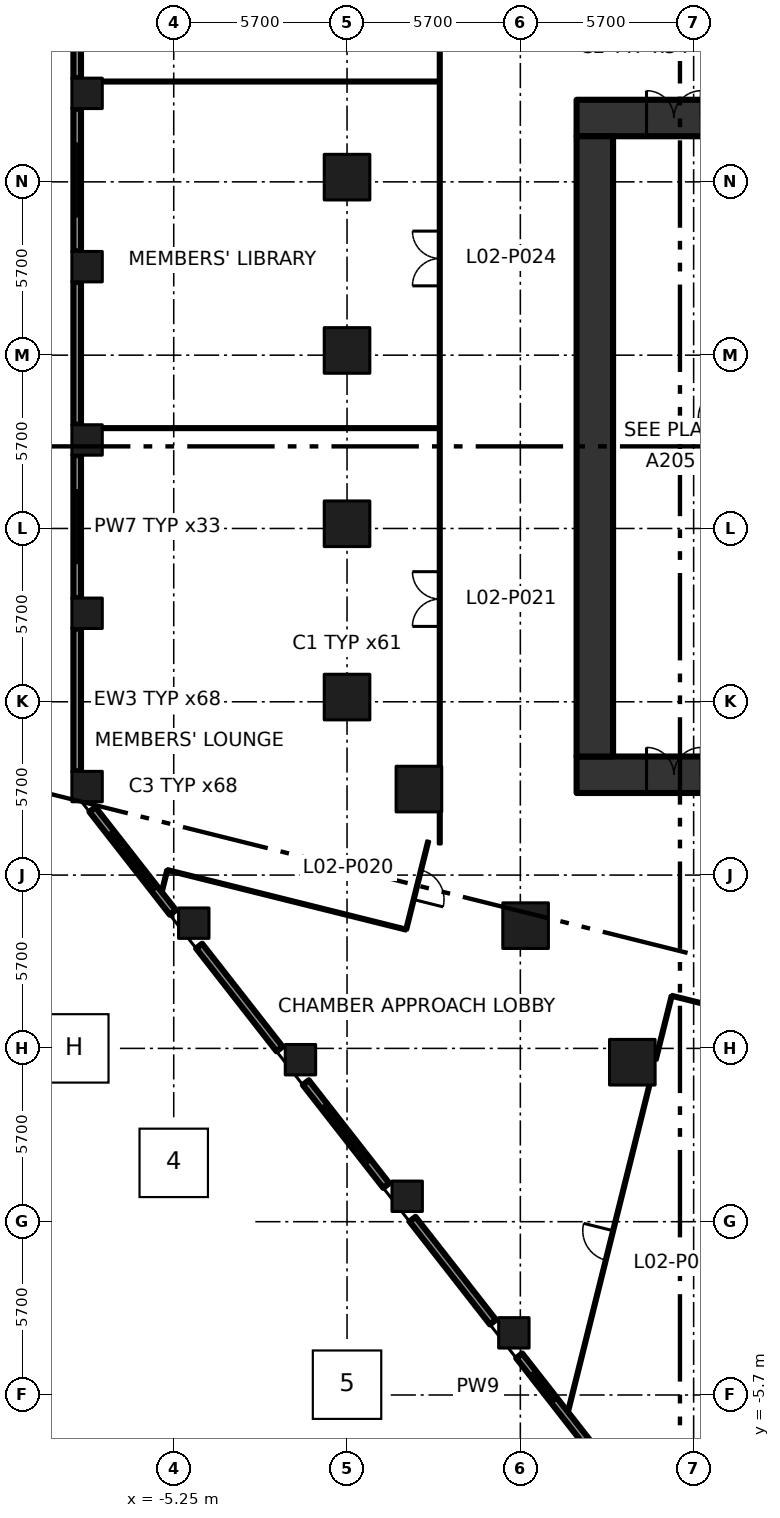
"""IFC4 building model, lengths in metres.
Left out: names, types, materials, properties, quantities, classifications, styles, units other than length and angle.
Written with IfcOpenShell. Run it as: python <this file> out.ifc"""

import sys

from ifc_helpers import new_model, si_unit, direction, frame, frame_2d, origin, origin_2d, place, context, subcontext, project, spatial, rectangle, extrude, element, fill, save


model = new_model("IFC4")
c1 = context("Model", 3, precision=1e-05, world=origin(), true_north=direction((0.0, 1.0)))
c2 = subcontext(c1, "Body", "Model", "MODEL_VIEW")
j1 = project(units=[si_unit("LENGTHUNIT", "METRE"), si_unit("PLANEANGLEUNIT", "RADIAN")], contexts=[c1])
p1 = place(None, origin())
s1 = spatial("IfcSite", under=j1, at=p1, CompositionType="ELEMENT")
p2 = place(p1, origin())
s2 = spatial("IfcBuilding", under=s1, at=p2, CompositionType="ELEMENT")
p3 = place(p2, frame((0.0, 0.0, 12.6)))
s3 = spatial("IfcBuildingStorey", under=s2, at=p3, CompositionType="ELEMENT", Elevation=12.6)
for number, where, z_axis, x_axis in (
    (1, (0.45, 17.255, 0.0), (0.0, 0.0, 1.0), (1.0, 0.0, 0.0)),
    (2, (0.45, 22.955, 0.0), (0.0, 0.0, 1.0), (1.0, 0.0, 0.0)),
    (3, (0.45, 28.655, 0.0), (0.0, 0.0, 1.0), (1.0, 0.0, 0.0)),
    (4, (0.45, 34.355, 0.0), (0.0, 0.0, 1.0), (1.0, 0.0, 0.0)),
    (5, (9.833, 5.245, 0.0), (0.0, 0.0, 1.0), (1.0, 0.0, 0.0)),
    (6, (6.323, 9.737, 0.0), (0.0, 0.0, 1.0), (1.0, 0.0, 0.0)),
    (7, (2.814, 14.229, 0.0), (0.0, 0.0, 1.0), (1.0, 0.0, 0.0)),
):
    element("IfcColumn", number, at=place(p3, frame(where, z_axis=z_axis, x_axis=x_axis)), inside=s3, PredefinedType="COLUMN", context=c2, shape_type="SweptSolid", body=[
        extrude(rectangle(XDim=1.5, YDim=1.5, at=origin_2d()), origin(), (0.0, 0.0, 1.0), 6.0),
    ])
for number, where, z_axis, x_axis in (
    (8, (-8.1, 14.311, 0.0), (0.0, 0.0, 1.0), (1.0, 0.0, 0.0)),
    (9, (-8.1, 20.011, 0.0), (0.0, 0.0, 1.0), (1.0, 0.0, 0.0)),
    (10, (-8.1, 25.711, 0.0), (0.0, 0.0, 1.0), (1.0, 0.0, 0.0)),
    (11, (-8.1, 31.411, 0.0), (0.0, 0.0, 1.0), (1.0, 0.0, 0.0)),
    (12, (-8.1, 37.111, 0.0), (0.0, 0.0, 1.0), (1.0, 0.0, 0.0)),
    (13, (-4.591, 9.819, 0.0), (0.0, 0.0, 1.0), (1.0, 0.0, 0.0)),
    (14, (-1.082, 5.328, 0.0), (0.0, 0.0, 1.0), (1.0, 0.0, 0.0)),
    (15, (2.428, 0.836, 0.0), (0.0, 0.0, 1.0), (1.0, 0.0, 0.0)),
    (16, (5.937, -3.656, 0.0), (0.0, 0.0, 1.0), (1.0, 0.0, 0.0)),
):
    element("IfcColumn", number, at=place(p3, frame(where, z_axis=z_axis, x_axis=x_axis)), inside=s3, PredefinedType="COLUMN", context=c2, shape_type="SweptSolid", body=[
        extrude(rectangle(XDim=1.0, YDim=1.0, at=origin_2d()), origin(), (0.0, 0.0, 1.0), 6.0),
    ])
p4 = place(p3, frame((8.0, 14.7, -0.45), z_axis=(0.0, 0.0, 1.0), x_axis=(1.0, 0.0, 0.0)))
e17 = element("IfcWall", 17, at=p4, inside=s3, PredefinedType="SHEAR", context=c2, shape_type="SweptSolid", body=[
    extrude(rectangle(XDim=22.8, YDim=1.2, at=frame_2d((11.4, 0.0))), origin(), (0.0, 0.0, 1.0), 6.0),
])
p5 = place(p4, frame((2.3, 0.0, 0.45)))
e18 = element("IfcOpeningElement", 18, at=p5, cuts=e17, PredefinedType="OPENING", context=c2, shape_type="SweptSolid", body=[
    extrude(rectangle(XDim=1.8, YDim=2.1, at=frame_2d((0.9, 1.05))), frame((0.0, 0.61, 0.0), z_axis=(0.0, -1.0, 0.0), x_axis=(1.0, 0.0, 0.0)), (0.0, 0.0, 1.0), 1.22),
])
p6 = place(p3, frame((8.0, 36.3, -0.45), z_axis=(0.0, 0.0, 1.0), x_axis=(1.0, 0.0, 0.0)))
e19 = element("IfcWall", 19, at=p6, inside=s3, PredefinedType="SHEAR", context=c2, shape_type="SweptSolid", body=[
    extrude(rectangle(XDim=22.8, YDim=1.2, at=frame_2d((11.4, 0.0))), origin(), (0.0, 0.0, 1.0), 6.0),
])
p7 = place(p6, frame((2.3, 0.0, 0.45)))
e20 = element("IfcOpeningElement", 20, at=p7, cuts=e19, PredefinedType="OPENING", context=c2, shape_type="SweptSolid", body=[
    extrude(rectangle(XDim=1.8, YDim=2.1, at=frame_2d((0.9, 1.05))), frame((0.0, 0.61, 0.0), z_axis=(0.0, -1.0, 0.0), x_axis=(1.0, 0.0, 0.0)), (0.0, 0.0, 1.0), 1.22),
])
p8 = place(p3, frame((8.6, 15.3, -0.45), z_axis=(0.0, 0.0, 1.0), x_axis=(0.0, 1.0, 0.0)))
e21 = element("IfcWall", 21, at=p8, inside=s3, PredefinedType="SHEAR", context=c2, shape_type="SweptSolid", body=[
    extrude(rectangle(XDim=20.4, YDim=1.2, at=frame_2d((10.2, 0.0))), origin(), (0.0, 0.0, 1.0), 6.0),
])
p9 = place(p3, frame((-5.464, 11.565, 0.0), z_axis=(0.0, 0.0, 1.0), x_axis=(-0.24207252228, -0.970258158408, 0.0)))
e22 = element("IfcWall", 22, at=p9, inside=s3, PredefinedType="PARTITIONING", context=c2, shape_type="SweptSolid", body=[
    extrude(rectangle(XDim=0.744, YDim=0.1, at=frame_2d((0.372, 0.0))), origin(), (0.0, 0.0, 1.0), 5.55),
])
p10 = place(p3, frame((2.395, 9.606, 0.0), z_axis=(0.0, 0.0, 1.0), x_axis=(-0.97031070843, 0.241861797535, 0.0)))
e23 = element("IfcWall", 23, at=p10, inside=s3, PredefinedType="PARTITIONING", context=c2, shape_type="SweptSolid", body=[
    extrude(rectangle(XDim=8.1, YDim=0.1, at=frame_2d((4.05, 0.0))), origin(), (0.0, 0.0, 1.0), 5.55),
])
p11 = place(p3, frame((3.121, 12.517, 0.0), z_axis=(0.0, 0.0, 1.0), x_axis=(-0.241999491975, -0.970276376031, 0.0)))
e24 = element("IfcWall", 24, at=p11, inside=s3, PredefinedType="PARTITIONING", context=c2, shape_type="SweptSolid", body=[
    extrude(rectangle(XDim=3.0, YDim=0.1, at=frame_2d((1.5, 0.0))), origin(), (0.0, 0.0, 1.0), 5.55),
])
p12 = place(p11, frame((0.98, 0.0, 0.0)))
e25 = element("IfcOpeningElement", 25, at=p12, cuts=e24, PredefinedType="OPENING", context=c2, shape_type="SweptSolid", body=[
    extrude(rectangle(XDim=1.0, YDim=2.1, at=frame_2d((0.5, 1.05))), frame((0.0, 0.06, 0.0), z_axis=(0.0, -1.0, 0.0), x_axis=(1.0, 0.0, 0.0)), (0.0, 0.0, 1.0), 0.12),
])
p13 = place(p3, frame((3.5, 13.459, 0.0), z_axis=(0.0, 0.0, 1.0), x_axis=(0.0, -1.0, 0.0)))
e26 = element("IfcWall", 26, at=p13, inside=s3, PredefinedType="PARTITIONING", context=c2, shape_type="SweptSolid", body=[
    extrude(rectangle(XDim=1.036, YDim=0.1, at=frame_2d((0.518, 0.0))), origin(), (0.0, 0.0, 1.0), 5.55),
])
p14 = place(p3, frame((3.5, 14.999, 0.0), z_axis=(0.0, 0.0, 1.0), x_axis=(0.0, 1.0, 0.0)))
e27 = element("IfcWall", 27, at=p14, inside=s3, PredefinedType="PARTITIONING", context=c2, shape_type="SweptSolid", body=[
    extrude(rectangle(XDim=26.401, YDim=0.1, at=frame_2d((13.2, 0.0))), origin(), (0.0, 0.0, 1.0), 5.55),
])
p15 = place(p14, frame((4.58, 0.0, 0.0)))
e28 = element("IfcOpeningElement", 28, at=p15, cuts=e27, PredefinedType="OPENING", context=c2, shape_type="SweptSolid", body=[
    extrude(rectangle(XDim=1.8, YDim=2.1, at=frame_2d((0.9, 1.05))), frame((0.0, 0.06, 0.0), z_axis=(0.0, -1.0, 0.0), x_axis=(1.0, 0.0, 0.0)), (0.0, 0.0, 1.0), 0.12),
])
p16 = place(p14, frame((15.781, 0.0, 0.0)))
e29 = element("IfcOpeningElement", 29, at=p16, cuts=e27, PredefinedType="OPENING", context=c2, shape_type="SweptSolid", body=[
    extrude(rectangle(XDim=1.8, YDim=2.1, at=frame_2d((0.9, 1.05))), frame((0.0, 0.06, 0.0), z_axis=(0.0, -1.0, 0.0), x_axis=(1.0, 0.0, 0.0)), (0.0, 0.0, 1.0), 0.12),
])
p17 = place(p14, frame((23.681, 0.0, 0.0)))
e30 = element("IfcOpeningElement", 30, at=p17, cuts=e27, PredefinedType="OPENING", context=c2, shape_type="SweptSolid", body=[
    extrude(rectangle(XDim=1.8, YDim=2.1, at=frame_2d((0.9, 1.05))), frame((0.0, 0.06, 0.0), z_axis=(0.0, -1.0, 0.0), x_axis=(1.0, 0.0, 0.0)), (0.0, 0.0, 1.0), 0.12),
])
p18 = place(p3, frame((7.716, -6.257, 0.0), z_axis=(0.0, 0.0, 1.0), x_axis=(0.241891576484, 0.970303285177, 0.0)))
e31 = element("IfcWall", 31, at=p18, inside=s3, PredefinedType="PARTITIONING", context=c2, shape_type="SweptSolid", body=[
    extrude(rectangle(XDim=11.061, YDim=0.1, at=frame_2d((5.53, 0.0))), origin(), (0.0, 0.0, 1.0), 5.55),
])
p19 = place(p18, frame((5.144, 0.0, 0.0)))
e32 = element("IfcOpeningElement", 32, at=p19, cuts=e31, PredefinedType="OPENING", context=c2, shape_type="SweptSolid", body=[
    extrude(rectangle(XDim=1.0, YDim=2.1, at=frame_2d((0.5, 1.05))), frame((0.0, 0.06, 0.0), z_axis=(0.0, -1.0, 0.0), x_axis=(1.0, 0.0, 0.0)), (0.0, 0.0, 1.0), 0.12),
])
p20 = place(p3, frame((10.603, 5.323, 0.0), z_axis=(0.0, 0.0, 1.0), x_axis=(0.241847407238, 0.970314295273, 0.0)))
e33 = element("IfcWall", 33, at=p20, inside=s3, PredefinedType="PARTITIONING", context=c2, shape_type="SweptSolid", body=[
    extrude(rectangle(XDim=2.17, YDim=0.1, at=frame_2d((1.085, 0.0))), origin(), (0.0, 0.0, 1.0), 5.55),
])
p21 = place(p3, frame((11.128, 7.429, 0.0), z_axis=(0.0, 0.0, 1.0), x_axis=(0.970310377339, -0.241863125815, 0.0)))
e34 = element("IfcWall", 34, at=p21, inside=s3, PredefinedType="PARTITIONING", context=c2, shape_type="SweptSolid", body=[
    extrude(rectangle(XDim=7.859, YDim=0.1, at=frame_2d((3.93, 0.0))), origin(), (0.0, 0.0, 1.0), 5.55),
])
for number, where, z_axis, x_axis in (
    (35, (3.45, 26.1, 0.0), (0.0, 0.0, 1.0), (-1.0, 0.0, 0.0)),
    (36, (3.45, 37.5, 0.0), (0.0, 0.0, 1.0), (-1.0, 0.0, 0.0)),
):
    element("IfcWall", number, at=place(p3, frame(where, z_axis=z_axis, x_axis=x_axis)), inside=s3, PredefinedType="PARTITIONING", context=c2, shape_type="SweptSolid", body=[
        extrude(rectangle(XDim=11.03, YDim=0.1, at=frame_2d((5.515, 0.0))), origin(), (0.0, 0.0, 1.0), 5.55),
    ])
p22 = place(p3, frame((-8.425, 42.311, 0.0), z_axis=(0.0, 0.0, 1.0), x_axis=(0.0, -1.0, 0.0)))
e37 = element("IfcWall", 37, at=p22, inside=s3, PredefinedType="SOLIDWALL", context=c2, shape_type="SweptSolid", body=[
    extrude(rectangle(XDim=4.7, YDim=0.25, at=frame_2d((2.35, 0.0))), origin(), (0.0, 0.0, 1.0), 4.65),
])
p23 = place(p3, frame((-8.425, 36.611, 0.0), z_axis=(0.0, 0.0, 1.0), x_axis=(0.0, -1.0, 0.0)))
e38 = element("IfcWall", 38, at=p23, inside=s3, PredefinedType="SOLIDWALL", context=c2, shape_type="SweptSolid", body=[
    extrude(rectangle(XDim=4.7, YDim=0.25, at=frame_2d((2.35, 0.0))), origin(), (0.0, 0.0, 1.0), 4.65),
])
p24 = place(p23, frame((1.15, 0.0, 0.9)))
e39 = element("IfcOpeningElement", 39, at=p24, cuts=e38, PredefinedType="OPENING", context=c2, shape_type="SweptSolid", body=[
    extrude(rectangle(XDim=2.4, YDim=3.3, at=frame_2d((1.2, 1.65))), frame((0.0, 0.135, 0.0), z_axis=(0.0, -1.0, 0.0), x_axis=(1.0, 0.0, 0.0)), (0.0, 0.0, 1.0), 0.27),
])
p25 = place(p3, frame((-8.425, 30.911, 0.0), z_axis=(0.0, 0.0, 1.0), x_axis=(0.0, -1.0, 0.0)))
e40 = element("IfcWall", 40, at=p25, inside=s3, PredefinedType="SOLIDWALL", context=c2, shape_type="SweptSolid", body=[
    extrude(rectangle(XDim=4.7, YDim=0.25, at=frame_2d((2.35, 0.0))), origin(), (0.0, 0.0, 1.0), 4.65),
])
p26 = place(p3, frame((-8.425, 25.211, 0.0), z_axis=(0.0, 0.0, 1.0), x_axis=(0.0, -1.0, 0.0)))
e41 = element("IfcWall", 41, at=p26, inside=s3, PredefinedType="SOLIDWALL", context=c2, shape_type="SweptSolid", body=[
    extrude(rectangle(XDim=4.7, YDim=0.25, at=frame_2d((2.35, 0.0))), origin(), (0.0, 0.0, 1.0), 4.65),
])
p27 = place(p26, frame((1.15, 0.0, 0.9)))
e42 = element("IfcOpeningElement", 42, at=p27, cuts=e41, PredefinedType="OPENING", context=c2, shape_type="SweptSolid", body=[
    extrude(rectangle(XDim=2.4, YDim=3.3, at=frame_2d((1.2, 1.65))), frame((0.0, 0.135, 0.0), z_axis=(0.0, -1.0, 0.0), x_axis=(1.0, 0.0, 0.0)), (0.0, 0.0, 1.0), 0.27),
])
p28 = place(p3, frame((-8.425, 19.511, 0.0), z_axis=(0.0, 0.0, 1.0), x_axis=(0.0, -1.0, 0.0)))
e43 = element("IfcWall", 43, at=p28, inside=s3, PredefinedType="SOLIDWALL", context=c2, shape_type="SweptSolid", body=[
    extrude(rectangle(XDim=4.7, YDim=0.25, at=frame_2d((2.35, 0.0))), origin(), (0.0, 0.0, 1.0), 4.65),
])
p29 = place(p3, frame((-7.924, 13.558, 0.0), z_axis=(0.0, 0.0, 1.0), x_axis=(0.615603242749, -0.788056246417, 0.0)))
e44 = element("IfcWall", 44, at=p29, inside=s3, PredefinedType="SOLIDWALL", context=c2, shape_type="SweptSolid", body=[
    extrude(rectangle(XDim=4.297, YDim=0.25, at=frame_2d((2.148, 0.0))), origin(), (0.0, 0.0, 1.0), 4.65),
])
p30 = place(p29, frame((0.948, 0.0, 0.9)))
e45 = element("IfcOpeningElement", 45, at=p30, cuts=e44, PredefinedType="OPENING", context=c2, shape_type="SweptSolid", body=[
    extrude(rectangle(XDim=2.4, YDim=3.3, at=frame_2d((1.2, 1.65))), frame((0.0, 0.135, 0.0), z_axis=(0.0, -1.0, 0.0), x_axis=(1.0, 0.0, 0.0)), (0.0, 0.0, 1.0), 0.27),
])
p31 = place(p3, frame((-4.415, 9.066, 0.0), z_axis=(0.0, 0.0, 1.0), x_axis=(0.615713519567, -0.787970089421, 0.0)))
e46 = element("IfcWall", 46, at=p31, inside=s3, PredefinedType="SOLIDWALL", context=c2, shape_type="SweptSolid", body=[
    extrude(rectangle(XDim=4.296, YDim=0.25, at=frame_2d((2.148, 0.0))), origin(), (0.0, 0.0, 1.0), 4.65),
])
p32 = place(p3, frame((-0.906, 4.575, 0.0), z_axis=(0.0, 0.0, 1.0), x_axis=(0.61574436495, -0.787945986113, 0.0)))
e47 = element("IfcWall", 47, at=p32, inside=s3, PredefinedType="SOLIDWALL", context=c2, shape_type="SweptSolid", body=[
    extrude(rectangle(XDim=4.297, YDim=0.25, at=frame_2d((2.148, 0.0))), origin(), (0.0, 0.0, 1.0), 4.65),
])
p33 = place(p32, frame((0.949, 0.0, 0.9)))
e48 = element("IfcOpeningElement", 48, at=p33, cuts=e47, PredefinedType="OPENING", context=c2, shape_type="SweptSolid", body=[
    extrude(rectangle(XDim=2.4, YDim=3.3, at=frame_2d((1.2, 1.65))), frame((0.0, 0.135, 0.0), z_axis=(0.0, -1.0, 0.0), x_axis=(1.0, 0.0, 0.0)), (0.0, 0.0, 1.0), 0.27),
])
p34 = place(p3, frame((2.604, 0.083, 0.0), z_axis=(0.0, 0.0, 1.0), x_axis=(0.615603242749, -0.788056246417, 0.0)))
e49 = element("IfcWall", 49, at=p34, inside=s3, PredefinedType="SOLIDWALL", context=c2, shape_type="SweptSolid", body=[
    extrude(rectangle(XDim=4.297, YDim=0.25, at=frame_2d((2.148, 0.0))), origin(), (0.0, 0.0, 1.0), 4.65),
])
p35 = place(p3, frame((6.113, -4.409, 0.0), z_axis=(0.0, 0.0, 1.0), x_axis=(0.615603242749, -0.788056246417, 0.0)))
e50 = element("IfcWall", 50, at=p35, inside=s3, PredefinedType="SOLIDWALL", context=c2, shape_type="SweptSolid", body=[
    extrude(rectangle(XDim=4.297, YDim=0.25, at=frame_2d((2.148, 0.0))), origin(), (0.0, 0.0, 1.0), 4.65),
])
p36 = place(p35, frame((0.702, 0.0, 0.9)))
e51 = element("IfcOpeningElement", 51, at=p36, cuts=e50, PredefinedType="OPENING", context=c2, shape_type="SweptSolid", body=[
    extrude(rectangle(XDim=1.2, YDim=3.3, at=frame_2d((0.6, 1.65))), frame((0.0, 0.135, 0.0), z_axis=(0.0, -1.0, 0.0), x_axis=(1.0, 0.0, 0.0)), (0.0, 0.0, 1.0), 0.27),
])
p37 = place(p7, origin())
e52 = element("IfcDoor", 52, at=p37, inside=s3, OperationType="DOUBLE_DOOR_SINGLE_SWING", PredefinedType="DOOR", context=c2, shape_type="SweptSolid", body=[
    extrude(rectangle(XDim=1.8, YDim=2.1, at=frame_2d((0.9, 1.05))), frame((0.0, 0.025, 0.0), z_axis=(0.0, -1.0, 0.0), x_axis=(1.0, 0.0, 0.0)), (0.0, 0.0, 1.0), 0.05),
])
fill(e20, e52)
p38 = place(p5, origin())
e53 = element("IfcDoor", 53, at=p38, inside=s3, OperationType="DOUBLE_DOOR_SINGLE_SWING", PredefinedType="DOOR", context=c2, shape_type="SweptSolid", body=[
    extrude(rectangle(XDim=1.8, YDim=2.1, at=frame_2d((0.9, 1.05))), frame((0.0, 0.025, 0.0), z_axis=(0.0, -1.0, 0.0), x_axis=(1.0, 0.0, 0.0)), (0.0, 0.0, 1.0), 0.05),
])
fill(e18, e53)
p39 = place(p19, origin())
e54 = element("IfcDoor", 54, at=p39, inside=s3, OperationType="SINGLE_SWING_RIGHT", PredefinedType="DOOR", context=c2, shape_type="SweptSolid", body=[
    extrude(rectangle(XDim=1.0, YDim=2.1, at=frame_2d((0.5, 1.05))), frame((0.0, 0.025, 0.0), z_axis=(0.0, -1.0, 0.0), x_axis=(1.0, 0.0, 0.0)), (0.0, 0.0, 1.0), 0.05),
])
fill(e32, e54)
p40 = place(p12, origin())
e55 = element("IfcDoor", 55, at=p40, inside=s3, OperationType="SINGLE_SWING_RIGHT", PredefinedType="DOOR", context=c2, shape_type="SweptSolid", body=[
    extrude(rectangle(XDim=1.0, YDim=2.1, at=frame_2d((0.5, 1.05))), frame((0.0, 0.025, 0.0), z_axis=(0.0, -1.0, 0.0), x_axis=(1.0, 0.0, 0.0)), (0.0, 0.0, 1.0), 0.05),
])
fill(e25, e55)
p41 = place(p15, origin())
e56 = element("IfcDoor", 56, at=p41, inside=s3, OperationType="DOUBLE_DOOR_SINGLE_SWING", PredefinedType="DOOR", context=c2, shape_type="SweptSolid", body=[
    extrude(rectangle(XDim=1.8, YDim=2.1, at=frame_2d((0.9, 1.05))), frame((0.0, 0.025, 0.0), z_axis=(0.0, -1.0, 0.0), x_axis=(1.0, 0.0, 0.0)), (0.0, 0.0, 1.0), 0.05),
])
fill(e28, e56)
p42 = place(p16, origin())
e57 = element("IfcDoor", 57, at=p42, inside=s3, OperationType="DOUBLE_DOOR_SINGLE_SWING", PredefinedType="DOOR", context=c2, shape_type="SweptSolid", body=[
    extrude(rectangle(XDim=1.8, YDim=2.1, at=frame_2d((0.9, 1.05))), frame((0.0, 0.025, 0.0), z_axis=(0.0, -1.0, 0.0), x_axis=(1.0, 0.0, 0.0)), (0.0, 0.0, 1.0), 0.05),
])
fill(e29, e57)
p43 = place(p24, origin())
e58 = element("IfcWindow", 58, at=p43, inside=s3, PartitioningType="DOUBLE_PANEL_VERTICAL", PredefinedType="WINDOW", context=c2, shape_type="SweptSolid", body=[
    extrude(rectangle(XDim=2.4, YDim=3.3, at=frame_2d((1.2, 1.65))), frame((0.0, 0.03, 0.0), z_axis=(0.0, -1.0, 0.0), x_axis=(1.0, 0.0, 0.0)), (0.0, 0.0, 1.0), 0.06),
])
fill(e39, e58)
p44 = place(p27, origin())
e59 = element("IfcWindow", 59, at=p44, inside=s3, PartitioningType="DOUBLE_PANEL_VERTICAL", PredefinedType="WINDOW", context=c2, shape_type="SweptSolid", body=[
    extrude(rectangle(XDim=2.4, YDim=3.3, at=frame_2d((1.2, 1.65))), frame((0.0, 0.03, 0.0), z_axis=(0.0, -1.0, 0.0), x_axis=(1.0, 0.0, 0.0)), (0.0, 0.0, 1.0), 0.06),
])
fill(e42, e59)
p45 = place(p30, origin())
e60 = element("IfcWindow", 60, at=p45, inside=s3, PartitioningType="DOUBLE_PANEL_VERTICAL", PredefinedType="WINDOW", context=c2, shape_type="SweptSolid", body=[
    extrude(rectangle(XDim=2.4, YDim=3.3, at=frame_2d((1.2, 1.65))), frame((0.0, 0.03, 0.0), z_axis=(0.0, -1.0, 0.0), x_axis=(1.0, 0.0, 0.0)), (0.0, 0.0, 1.0), 0.06),
])
fill(e45, e60)
p46 = place(p33, origin())
e61 = element("IfcWindow", 61, at=p46, inside=s3, PartitioningType="DOUBLE_PANEL_VERTICAL", PredefinedType="WINDOW", context=c2, shape_type="SweptSolid", body=[
    extrude(rectangle(XDim=2.4, YDim=3.3, at=frame_2d((1.2, 1.65))), frame((0.0, 0.03, 0.0), z_axis=(0.0, -1.0, 0.0), x_axis=(1.0, 0.0, 0.0)), (0.0, 0.0, 1.0), 0.06),
])
fill(e48, e61)
p47 = place(p36, origin())
e62 = element("IfcWindow", 62, at=p47, inside=s3, PartitioningType="SINGLE_PANEL", PredefinedType="WINDOW", context=c2, shape_type="SweptSolid", body=[
    extrude(rectangle(XDim=1.2, YDim=3.3, at=frame_2d((0.6, 1.65))), frame((0.0, 0.03, 0.0), z_axis=(0.0, -1.0, 0.0), x_axis=(1.0, 0.0, 0.0)), (0.0, 0.0, 1.0), 0.06),
])
fill(e51, e62)
save(model, sys.argv[1])
